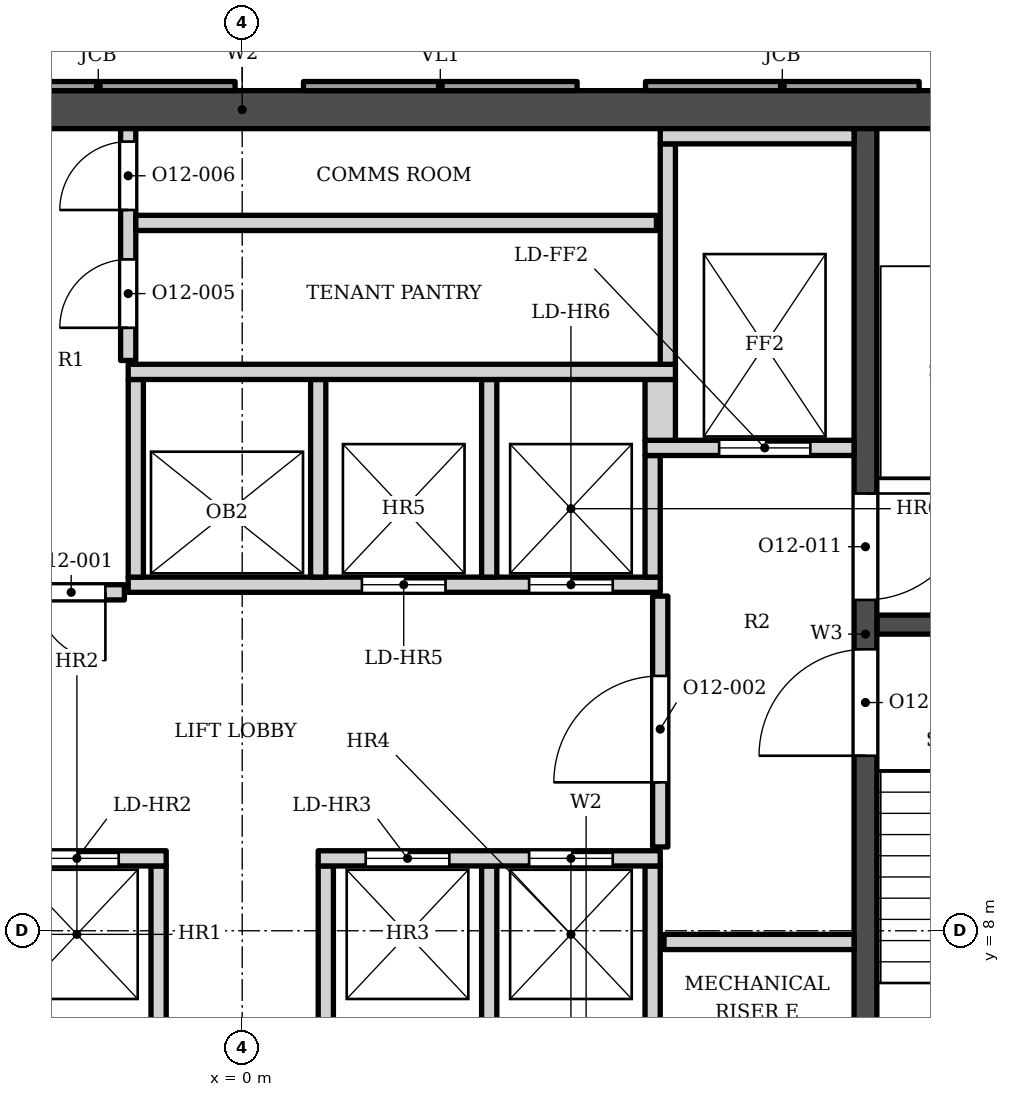
"""IFC4 building model, lengths in metres.
Left out: names, types, materials, properties, quantities, classifications, styles, units other than length and angle.
Written with IfcOpenShell. Run it as: python <this file> out.ifc"""

import sys

from ifc_helpers import new_model, si_unit, direction, frame, frame_2d, origin, place, context, subcontext, project, spatial, polyline, rectangle, outline, extrude, element, fill, save


model = new_model("IFC4")
c1 = context("Model", 3, precision=1e-05, world=origin(), true_north=direction((0.0, 1.0)))
c2 = subcontext(c1, "Body", "Model", "MODEL_VIEW")
j1 = project(units=[si_unit("LENGTHUNIT", "METRE"), si_unit("PLANEANGLEUNIT", "RADIAN")], contexts=[c1])
p1 = place(None, origin())
s1 = spatial("IfcSite", under=j1, at=p1, CompositionType="ELEMENT")
p2 = place(p1, origin())
s2 = spatial("IfcBuilding", under=s1, at=p2, CompositionType="ELEMENT")
p3 = place(p2, frame((0.0, 0.0, 279.4)))
s3 = spatial("IfcBuildingStorey", under=s2, at=p3, CompositionType="ELEMENT", Elevation=279.4)
p4 = place(p3, frame((-12.1, 18.802, 0.0), z_axis=(0.0, 0.0, 1.0), x_axis=(1.0, 0.0, 0.0)))
e1 = element("IfcWall", 1, at=p4, inside=s3, PredefinedType="SHEAR", context=c2, shape_type="SweptSolid", body=[
    extrude(rectangle(XDim=24.2, YDim=0.5, at=frame_2d((12.1, 0.0))), origin(), (0.0, 0.0, 1.0), 3.9),
])
p5 = place(p3, frame((8.2, 5.253, 0.0), z_axis=(0.0, 0.0, 1.0), x_axis=(0.0, 1.0, 0.0)))
e2 = element("IfcWall", 2, at=p5, inside=s3, PredefinedType="SHEAR", context=c2, shape_type="SweptSolid", body=[
    extrude(rectangle(XDim=13.3, YDim=0.3, at=frame_2d((6.65, 0.0))), origin(), (0.0, 0.0, 1.0), 3.9),
])
p6 = place(p5, frame((7.1, 0.0, 0.0)))
e3 = element("IfcOpeningElement", 3, at=p6, cuts=e2, PredefinedType="OPENING", context=c2, shape_type="SweptSolid", body=[
    extrude(rectangle(XDim=1.4, YDim=2.1, at=frame_2d((0.7, 1.05))), frame((0.0, 0.16, 0.0), z_axis=(0.0, -1.0, 0.0), x_axis=(1.0, 0.0, 0.0)), (0.0, 0.0, 1.0), 0.32),
])
p7 = place(p5, frame((5.05, 0.0, 0.0)))
e4 = element("IfcOpeningElement", 4, at=p7, cuts=e2, PredefinedType="OPENING", context=c2, shape_type="SweptSolid", body=[
    extrude(rectangle(XDim=1.4, YDim=2.1, at=frame_2d((0.7, 1.05))), frame((0.0, 0.16, 0.0), z_axis=(0.0, -1.0, 0.0), x_axis=(1.0, 0.0, 0.0)), (0.0, 0.0, 1.0), 0.32),
])
p8 = place(p3, frame((8.35, 12.028, 0.0), z_axis=(0.0, 0.0, 1.0), x_axis=(1.0, 0.0, 0.0)))
e5 = element("IfcWall", 5, at=p8, inside=s3, PredefinedType="SHEAR", context=c2, shape_type="SweptSolid", body=[
    extrude(rectangle(XDim=3.75, YDim=0.25, at=frame_2d((1.875, 0.0))), origin(), (0.0, 0.0, 1.0), 3.9),
])
p9 = place(p3, origin())
e6 = element("IfcWall", 6, at=p9, inside=s3, PredefinedType="SOLIDWALL", context=c2, shape_type="SweptSolid", body=[
    extrude(outline(polyline([(5.306, 19.173), (5.306, 19.052), (8.906, 19.052), (8.906, 19.173), (5.306, 19.173)])), origin(), (0.0, 0.0, 1.0), 3.0),
])
p10 = place(p3, origin())
e7 = element("IfcWall", 7, at=p10, inside=s3, PredefinedType="ELEMENTEDWALL", context=c2, shape_type="SweptSolid", body=[
    extrude(outline(polyline([(0.806, 19.173), (0.806, 19.052), (4.406, 19.052), (4.406, 19.173), (0.806, 19.173)])), origin(), (0.0, 0.0, 1.0), 3.0),
])
p11 = place(p3, origin())
e8 = element("IfcWall", 8, at=p11, inside=s3, PredefinedType="SOLIDWALL", context=c2, shape_type="SweptSolid", body=[
    extrude(outline(polyline([(-3.694, 19.173), (-3.694, 19.052), (-0.094, 19.052), (-0.094, 19.173), (-3.694, 19.173)])), origin(), (0.0, 0.0, 1.0), 3.0),
])
for number, where, z_axis, x_axis in (
    (9, (-1.1, 6.353, 0.0), (0.0, 0.0, 1.0), (0.0, 1.0, 0.0)),
    (10, (1.1, 6.353, 0.0), (0.0, 0.0, 1.0), (0.0, 1.0, 0.0)),
    (11, (3.25, 6.353, 0.0), (0.0, 0.0, 1.0), (0.0, 1.0, 0.0)),
    (12, (5.4, 6.353, 0.0), (0.0, 0.0, 1.0), (0.0, 1.0, 0.0)),
    (13, (5.55, 7.853, 0.0), (0.0, 0.0, 1.0), (1.0, 0.0, 0.0)),
):
    element("IfcWall", number, at=place(p3, frame(where, z_axis=z_axis, x_axis=x_axis)), inside=s3, PredefinedType="SOLIDWALL", context=c2, shape_type="SweptSolid", body=[
        extrude(rectangle(XDim=2.5, YDim=0.2, at=frame_2d((1.25, 0.0))), origin(), (0.0, 0.0, 1.0), 3.73),
    ])
p12 = place(p3, frame((-5.5, 8.953, 0.0), z_axis=(0.0, 0.0, 1.0), x_axis=(1.0, 0.0, 0.0)))
e14 = element("IfcWall", 14, at=p12, inside=s3, PredefinedType="SOLIDWALL", context=c2, shape_type="SweptSolid", body=[
    extrude(rectangle(XDim=4.5, YDim=0.2, at=frame_2d((2.25, 0.0))), origin(), (0.0, 0.0, 1.0), 3.73),
])
p13 = place(p12, frame((0.625, 0.0, 0.0)))
e15 = element("IfcOpeningElement", 15, at=p13, cuts=e14, PredefinedType="OPENING", context=c2, shape_type="SweptSolid", body=[
    extrude(rectangle(XDim=1.1, YDim=2.1, at=frame_2d((0.55, 1.05))), frame((0.0, 0.11, 0.0), z_axis=(0.0, -1.0, 0.0), x_axis=(1.0, 0.0, 0.0)), (0.0, 0.0, 1.0), 0.22),
])
p14 = place(p12, frame((2.775, 0.0, 0.0)))
e16 = element("IfcOpeningElement", 16, at=p14, cuts=e14, PredefinedType="OPENING", context=c2, shape_type="SweptSolid", body=[
    extrude(rectangle(XDim=1.1, YDim=2.1, at=frame_2d((0.55, 1.05))), frame((0.0, 0.11, 0.0), z_axis=(0.0, -1.0, 0.0), x_axis=(1.0, 0.0, 0.0)), (0.0, 0.0, 1.0), 0.22),
])
p15 = place(p3, frame((1.0, 8.953, 0.0), z_axis=(0.0, 0.0, 1.0), x_axis=(1.0, 0.0, 0.0)))
e17 = element("IfcWall", 17, at=p15, inside=s3, PredefinedType="SOLIDWALL", context=c2, shape_type="SweptSolid", body=[
    extrude(rectangle(XDim=4.5, YDim=0.2, at=frame_2d((2.25, 0.0))), origin(), (0.0, 0.0, 1.0), 3.73),
])
p16 = place(p15, frame((0.625, 0.0, 0.0)))
e18 = element("IfcOpeningElement", 18, at=p16, cuts=e17, PredefinedType="OPENING", context=c2, shape_type="SweptSolid", body=[
    extrude(rectangle(XDim=1.1, YDim=2.1, at=frame_2d((0.55, 1.05))), frame((0.0, 0.11, 0.0), z_axis=(0.0, -1.0, 0.0), x_axis=(1.0, 0.0, 0.0)), (0.0, 0.0, 1.0), 0.22),
])
p17 = place(p15, frame((2.775, 0.0, 0.0)))
e19 = element("IfcOpeningElement", 19, at=p17, cuts=e17, PredefinedType="OPENING", context=c2, shape_type="SweptSolid", body=[
    extrude(rectangle(XDim=1.1, YDim=2.1, at=frame_2d((0.55, 1.05))), frame((0.0, 0.11, 0.0), z_axis=(0.0, -1.0, 0.0), x_axis=(1.0, 0.0, 0.0)), (0.0, 0.0, 1.0), 0.22),
])
p18 = place(p3, frame((5.5, 9.103, 0.0), z_axis=(0.0, 0.0, 1.0), x_axis=(0.0, 1.0, 0.0)))
e20 = element("IfcWall", 20, at=p18, inside=s3, PredefinedType="SOLIDWALL", context=c2, shape_type="SweptSolid", body=[
    extrude(rectangle(XDim=3.3, YDim=0.2, at=frame_2d((1.65, 0.0))), origin(), (0.0, 0.0, 1.0), 3.73),
])
p19 = place(p18, frame((0.85, 0.0, 0.0)))
e21 = element("IfcOpeningElement", 21, at=p19, cuts=e20, PredefinedType="OPENING", context=c2, shape_type="SweptSolid", body=[
    extrude(rectangle(XDim=1.4, YDim=2.1, at=frame_2d((0.7, 1.05))), frame((0.0, 0.11, 0.0), z_axis=(0.0, -1.0, 0.0), x_axis=(1.0, 0.0, 0.0)), (0.0, 0.0, 1.0), 0.22),
])
p20 = place(p3, frame((-2.95, 12.453, 0.0), z_axis=(0.0, 0.0, 1.0), x_axis=(1.0, 0.0, 0.0)))
e22 = element("IfcWall", 22, at=p20, inside=s3, PredefinedType="SOLIDWALL", context=c2, shape_type="SweptSolid", body=[
    extrude(rectangle(XDim=1.4, YDim=0.2, at=frame_2d((0.7, 0.0))), origin(), (0.0, 0.0, 1.0), 3.73),
])
p21 = place(p20, frame((0.25, 0.0, 0.0)))
e23 = element("IfcOpeningElement", 23, at=p21, cuts=e22, PredefinedType="OPENING", context=c2, shape_type="SweptSolid", body=[
    extrude(rectangle(XDim=0.9, YDim=2.1, at=frame_2d((0.45, 1.05))), frame((0.0, 0.11, 0.0), z_axis=(0.0, -1.0, 0.0), x_axis=(1.0, 0.0, 0.0)), (0.0, 0.0, 1.0), 0.22),
])
p22 = place(p3, frame((-1.5, 12.552, 0.0), z_axis=(0.0, 0.0, 1.0), x_axis=(1.0, 0.0, 0.0)))
e24 = element("IfcWall", 24, at=p22, inside=s3, PredefinedType="SOLIDWALL", context=c2, shape_type="SweptSolid", body=[
    extrude(rectangle(XDim=7.0, YDim=0.2, at=frame_2d((3.5, 0.0))), origin(), (0.0, 0.0, 1.0), 3.73),
])
p23 = place(p22, frame((3.075, 0.0, 0.0)))
e25 = element("IfcOpeningElement", 25, at=p23, cuts=e24, PredefinedType="OPENING", context=c2, shape_type="SweptSolid", body=[
    extrude(rectangle(XDim=1.1, YDim=2.1, at=frame_2d((0.55, 1.05))), frame((0.0, 0.11, 0.0), z_axis=(0.0, -1.0, 0.0), x_axis=(1.0, 0.0, 0.0)), (0.0, 0.0, 1.0), 0.22),
])
p24 = place(p22, frame((5.275, 0.0, 0.0)))
e26 = element("IfcOpeningElement", 26, at=p24, cuts=e24, PredefinedType="OPENING", context=c2, shape_type="SweptSolid", body=[
    extrude(rectangle(XDim=1.1, YDim=2.1, at=frame_2d((0.55, 1.05))), frame((0.0, 0.11, 0.0), z_axis=(0.0, -1.0, 0.0), x_axis=(1.0, 0.0, 0.0)), (0.0, 0.0, 1.0), 0.22),
])
for number, where, z_axis, x_axis in (
    (27, (-1.4, 12.653, 0.0), (0.0, 0.0, 1.0), (0.0, 1.0, 0.0)),
    (28, (1.0, 12.653, 0.0), (0.0, 0.0, 1.0), (0.0, 1.0, 0.0)),
    (29, (3.25, 12.653, 0.0), (0.0, 0.0, 1.0), (0.0, 1.0, 0.0)),
):
    element("IfcWall", number, at=place(p3, frame(where, z_axis=z_axis, x_axis=x_axis)), inside=s3, PredefinedType="SOLIDWALL", context=c2, shape_type="SweptSolid", body=[
        extrude(rectangle(XDim=2.6, YDim=0.2, at=frame_2d((1.3, 0.0))), origin(), (0.0, 0.0, 1.0), 3.73),
    ])
p25 = place(p3, frame((5.4, 12.653, 0.0), z_axis=(0.0, 0.0, 1.0), x_axis=(0.0, 1.0, 0.0)))
e30 = element("IfcWall", 30, at=p25, inside=s3, PredefinedType="SOLIDWALL", context=c2, shape_type="SweptSolid", body=[
    extrude(rectangle(XDim=1.6, YDim=0.2, at=frame_2d((0.8, 0.0))), origin(), (0.0, 0.0, 1.0), 3.73),
])
p26 = place(p3, frame((5.3, 14.353, 0.0), z_axis=(0.0, 0.0, 1.0), x_axis=(1.0, 0.0, 0.0)))
e31 = element("IfcWall", 31, at=p26, inside=s3, PredefinedType="SOLIDWALL", context=c2, shape_type="SweptSolid", body=[
    extrude(rectangle(XDim=2.75, YDim=0.2, at=frame_2d((1.375, 0.0))), origin(), (0.0, 0.0, 1.0), 3.73),
])
p27 = place(p26, frame((0.975, 0.0, 0.0)))
e32 = element("IfcOpeningElement", 32, at=p27, cuts=e31, PredefinedType="OPENING", context=c2, shape_type="SweptSolid", body=[
    extrude(rectangle(XDim=1.2, YDim=2.1, at=frame_2d((0.6, 1.05))), frame((0.0, 0.11, 0.0), z_axis=(0.0, -1.0, 0.0), x_axis=(1.0, 0.0, 0.0)), (0.0, 0.0, 1.0), 0.22),
])
p28 = place(p3, frame((5.5, 14.453, 0.0), z_axis=(0.0, 0.0, 1.0), x_axis=(0.0, 1.0, 0.0)))
e33 = element("IfcWall", 33, at=p28, inside=s3, PredefinedType="SOLIDWALL", context=c2, shape_type="SweptSolid", body=[
    extrude(rectangle(XDim=0.8, YDim=0.4, at=frame_2d((0.4, 0.0))), origin(), (0.0, 0.0, 1.0), 3.73),
])
p29 = place(p3, frame((-1.5, 15.353, 0.0), z_axis=(0.0, 0.0, 1.0), x_axis=(1.0, 0.0, 0.0)))
e34 = element("IfcWall", 34, at=p29, inside=s3, PredefinedType="SOLIDWALL", context=c2, shape_type="SweptSolid", body=[
    extrude(rectangle(XDim=7.2, YDim=0.2, at=frame_2d((3.6, 0.0))), origin(), (0.0, 0.0, 1.0), 3.73),
])
p30 = place(p3, frame((5.6, 15.453, 0.0), z_axis=(0.0, 0.0, 1.0), x_axis=(0.0, 1.0, 0.0)))
e35 = element("IfcWall", 35, at=p30, inside=s3, PredefinedType="SOLIDWALL", context=c2, shape_type="SweptSolid", body=[
    extrude(rectangle(XDim=2.9, YDim=0.2, at=frame_2d((1.45, 0.0))), origin(), (0.0, 0.0, 1.0), 3.73),
])
p31 = place(p3, frame((-1.5, 15.503, 0.0), z_axis=(0.0, 0.0, 1.0), x_axis=(0.0, 1.0, 0.0)))
e36 = element("IfcWall", 36, at=p31, inside=s3, PredefinedType="SOLIDWALL", context=c2, shape_type="SweptSolid", body=[
    extrude(rectangle(XDim=3.05, YDim=0.2, at=frame_2d((1.525, 0.0))), origin(), (0.0, 0.0, 1.0), 3.73),
])
p32 = place(p31, frame((0.43, 0.0, 0.0)))
e37 = element("IfcOpeningElement", 37, at=p32, cuts=e36, PredefinedType="OPENING", context=c2, shape_type="SweptSolid", body=[
    extrude(rectangle(XDim=0.9, YDim=2.1, at=frame_2d((0.45, 1.05))), frame((0.0, 0.11, 0.0), z_axis=(0.0, -1.0, 0.0), x_axis=(1.0, 0.0, 0.0)), (0.0, 0.0, 1.0), 0.22),
])
p33 = place(p31, frame((1.98, 0.0, 0.0)))
e38 = element("IfcOpeningElement", 38, at=p33, cuts=e36, PredefinedType="OPENING", context=c2, shape_type="SweptSolid", body=[
    extrude(rectangle(XDim=0.9, YDim=2.1, at=frame_2d((0.45, 1.05))), frame((0.0, 0.11, 0.0), z_axis=(0.0, -1.0, 0.0), x_axis=(1.0, 0.0, 0.0)), (0.0, 0.0, 1.0), 0.22),
])
p34 = place(p3, frame((-1.4, 17.312, 0.0), z_axis=(0.0, 0.0, 1.0), x_axis=(1.0, 0.0, 0.0)))
e39 = element("IfcWall", 39, at=p34, inside=s3, PredefinedType="SOLIDWALL", context=c2, shape_type="SweptSolid", body=[
    extrude(rectangle(XDim=6.85, YDim=0.2, at=frame_2d((3.425, 0.0))), origin(), (0.0, 0.0, 1.0), 3.73),
])
p35 = place(p3, frame((5.5, 18.453, 0.0), z_axis=(0.0, 0.0, 1.0), x_axis=(1.0, 0.0, 0.0)))
e40 = element("IfcWall", 40, at=p35, inside=s3, PredefinedType="SOLIDWALL", context=c2, shape_type="SweptSolid", body=[
    extrude(rectangle(XDim=2.55, YDim=0.2, at=frame_2d((1.275, 0.0))), origin(), (0.0, 0.0, 1.0), 3.73),
])
p36 = place(p14, origin())
e41 = element("IfcDoor", 41, at=p36, inside=s3, OperationType="DOUBLE_DOOR_SLIDING", PredefinedType="DOOR", context=c2, shape_type="SweptSolid", body=[
    extrude(rectangle(XDim=1.1, YDim=2.1, at=frame_2d((0.55, 1.05))), frame((0.0, 0.025, 0.0), z_axis=(0.0, -1.0, 0.0), x_axis=(1.0, 0.0, 0.0)), (0.0, 0.0, 1.0), 0.05),
])
fill(e16, e41)
p37 = place(p16, origin())
e42 = element("IfcDoor", 42, at=p37, inside=s3, OperationType="DOUBLE_DOOR_SLIDING", PredefinedType="DOOR", context=c2, shape_type="SweptSolid", body=[
    extrude(rectangle(XDim=1.1, YDim=2.1, at=frame_2d((0.55, 1.05))), frame((0.0, 0.025, 0.0), z_axis=(0.0, -1.0, 0.0), x_axis=(1.0, 0.0, 0.0)), (0.0, 0.0, 1.0), 0.05),
])
fill(e18, e42)
p38 = place(p17, origin())
e43 = element("IfcDoor", 43, at=p38, inside=s3, OperationType="DOUBLE_DOOR_SLIDING", PredefinedType="DOOR", context=c2, shape_type="SweptSolid", body=[
    extrude(rectangle(XDim=1.1, YDim=2.1, at=frame_2d((0.55, 1.05))), frame((0.0, 0.025, 0.0), z_axis=(0.0, -1.0, 0.0), x_axis=(1.0, 0.0, 0.0)), (0.0, 0.0, 1.0), 0.05),
])
fill(e19, e43)
p39 = place(p23, origin())
e44 = element("IfcDoor", 44, at=p39, inside=s3, OperationType="DOUBLE_DOOR_SLIDING", PredefinedType="DOOR", context=c2, shape_type="SweptSolid", body=[
    extrude(rectangle(XDim=1.1, YDim=2.1, at=frame_2d((0.55, 1.05))), frame((0.0, 0.025, 0.0), z_axis=(0.0, -1.0, 0.0), x_axis=(1.0, 0.0, 0.0)), (0.0, 0.0, 1.0), 0.05),
])
fill(e25, e44)
p40 = place(p24, origin())
e45 = element("IfcDoor", 45, at=p40, inside=s3, OperationType="DOUBLE_DOOR_SLIDING", PredefinedType="DOOR", context=c2, shape_type="SweptSolid", body=[
    extrude(rectangle(XDim=1.1, YDim=2.1, at=frame_2d((0.55, 1.05))), frame((0.0, 0.025, 0.0), z_axis=(0.0, -1.0, 0.0), x_axis=(1.0, 0.0, 0.0)), (0.0, 0.0, 1.0), 0.05),
])
fill(e26, e45)
p41 = place(p27, origin())
e46 = element("IfcDoor", 46, at=p41, inside=s3, OperationType="DOUBLE_DOOR_SLIDING", PredefinedType="DOOR", context=c2, shape_type="SweptSolid", body=[
    extrude(rectangle(XDim=1.2, YDim=2.1, at=frame_2d((0.6, 1.05))), frame((0.0, 0.025, 0.0), z_axis=(0.0, -1.0, 0.0), x_axis=(1.0, 0.0, 0.0)), (0.0, 0.0, 1.0), 0.05),
])
fill(e32, e46)
p42 = place(p6, origin())
e47 = element("IfcDoor", 47, at=p42, inside=s3, OperationType="SINGLE_SWING_RIGHT", PredefinedType="DOOR", context=c2, shape_type="SweptSolid", body=[
    extrude(rectangle(XDim=1.4, YDim=2.1, at=frame_2d((0.7, 1.05))), frame((0.0, 0.025, 0.0), z_axis=(0.0, -1.0, 0.0), x_axis=(1.0, 0.0, 0.0)), (0.0, 0.0, 1.0), 0.05),
])
fill(e3, e47)
p43 = place(p7, origin())
e48 = element("IfcDoor", 48, at=p43, inside=s3, OperationType="SINGLE_SWING_LEFT", PredefinedType="DOOR", context=c2, shape_type="SweptSolid", body=[
    extrude(rectangle(XDim=1.4, YDim=2.1, at=frame_2d((0.7, 1.05))), frame((0.0, 0.025, 0.0), z_axis=(0.0, -1.0, 0.0), x_axis=(1.0, 0.0, 0.0)), (0.0, 0.0, 1.0), 0.05),
])
fill(e4, e48)
p44 = place(p21, origin())
e49 = element("IfcDoor", 49, at=p44, inside=s3, OperationType="SINGLE_SWING_RIGHT", PredefinedType="DOOR", context=c2, shape_type="SweptSolid", body=[
    extrude(rectangle(XDim=0.9, YDim=2.1, at=frame_2d((0.45, 1.05))), frame((0.0, 0.025, 0.0), z_axis=(0.0, -1.0, 0.0), x_axis=(1.0, 0.0, 0.0)), (0.0, 0.0, 1.0), 0.05),
])
fill(e23, e49)
p45 = place(p19, origin())
e50 = element("IfcDoor", 50, at=p45, inside=s3, OperationType="SINGLE_SWING_LEFT", PredefinedType="DOOR", context=c2, shape_type="SweptSolid", body=[
    extrude(rectangle(XDim=1.4, YDim=2.1, at=frame_2d((0.7, 1.05))), frame((0.0, 0.025, 0.0), z_axis=(0.0, -1.0, 0.0), x_axis=(1.0, 0.0, 0.0)), (0.0, 0.0, 1.0), 0.05),
])
fill(e21, e50)
p46 = place(p32, origin())
e51 = element("IfcDoor", 51, at=p46, inside=s3, OperationType="SINGLE_SWING_LEFT", PredefinedType="DOOR", context=c2, shape_type="SweptSolid", body=[
    extrude(rectangle(XDim=0.9, YDim=2.1, at=frame_2d((0.45, 1.05))), frame((0.0, 0.025, 0.0), z_axis=(0.0, -1.0, 0.0), x_axis=(1.0, 0.0, 0.0)), (0.0, 0.0, 1.0), 0.05),
])
fill(e37, e51)
p47 = place(p33, origin())
e52 = element("IfcDoor", 52, at=p47, inside=s3, OperationType="SINGLE_SWING_LEFT", PredefinedType="DOOR", context=c2, shape_type="SweptSolid", body=[
    extrude(rectangle(XDim=0.9, YDim=2.1, at=frame_2d((0.45, 1.05))), frame((0.0, 0.025, 0.0), z_axis=(0.0, -1.0, 0.0), x_axis=(1.0, 0.0, 0.0)), (0.0, 0.0, 1.0), 0.05),
])
fill(e38, e52)
save(model, sys.argv[1])
